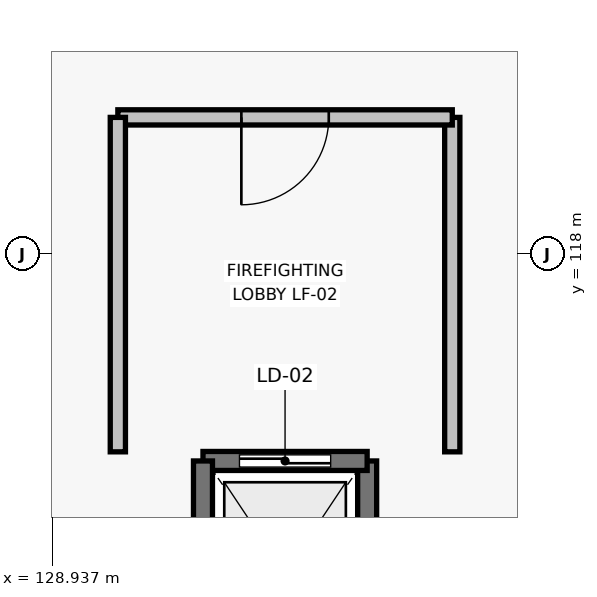
"""IFC4 building model, lengths in metres.
Left out: names, types, materials, properties, quantities, classifications, styles, units other than length and angle.
Written with IfcOpenShell. Run it as: python <this file> out.ifc"""

import sys

from ifc_helpers import new_model, si_unit, direction, frame, frame_2d, origin, place, context, subcontext, project, spatial, rectangle, extrude, element, fill, save


model = new_model("IFC4")
c1 = context("Model", 3, precision=1e-05, world=origin(), true_north=direction((0.0, 1.0)))
c2 = subcontext(c1, "Body", "Model", "MODEL_VIEW")
j1 = project(units=[si_unit("LENGTHUNIT", "METRE"), si_unit("PLANEANGLEUNIT", "RADIAN")], contexts=[c1])
p1 = place(None, origin())
s1 = spatial("IfcSite", under=j1, at=p1, CompositionType="ELEMENT")
p2 = place(p1, origin())
s2 = spatial("IfcBuilding", under=s1, at=p2, CompositionType="ELEMENT")
p3 = place(p2, frame((0.0, 0.0, 16.8)))
s3 = spatial("IfcBuildingStorey", under=s2, at=p3, CompositionType="ELEMENT", Elevation=16.8)
p4 = place(p3, frame((133.08, 112.32, 0.0), z_axis=(0.0, 0.0, 1.0), x_axis=(0.0, 1.0, 0.0)))
e1 = element("IfcWall", 1, at=p4, inside=s3, PredefinedType="SHEAR", context=c2, shape_type="SweptSolid", body=[
    extrude(rectangle(XDim=2.96, YDim=0.25, at=frame_2d((1.48, 0.0))), origin(), (0.0, 0.0, 1.0), 4.0),
])
p5 = place(p3, frame((133.08, 115.28, 0.0), z_axis=(0.0, 0.0, 1.0), x_axis=(-1.0, 0.0, 0.0)))
e2 = element("IfcWall", 2, at=p5, inside=s3, PredefinedType="SHEAR", context=c2, shape_type="SweptSolid", body=[
    extrude(rectangle(XDim=2.16, YDim=0.25, at=frame_2d((1.08, 0.0))), origin(), (0.0, 0.0, 1.0), 4.0),
])
p6 = place(p5, frame((0.48, 0.0, 0.0)))
e3 = element("IfcOpeningElement", 3, at=p6, cuts=e2, PredefinedType="OPENING", context=c2, shape_type="SweptSolid", body=[
    extrude(rectangle(XDim=1.2, YDim=2.2, at=frame_2d((0.6, 1.1))), frame((0.0, 0.135, 0.0), z_axis=(0.0, -1.0, 0.0), x_axis=(1.0, 0.0, 0.0)), (0.0, 0.0, 1.0), 0.27),
])
p7 = place(p3, frame((130.92, 115.28, 0.0), z_axis=(0.0, 0.0, 1.0), x_axis=(0.0, -1.0, 0.0)))
e4 = element("IfcWall", 4, at=p7, inside=s3, PredefinedType="SHEAR", context=c2, shape_type="SweptSolid", body=[
    extrude(rectangle(XDim=2.96, YDim=0.25, at=frame_2d((1.48, 0.0))), origin(), (0.0, 0.0, 1.0), 4.0),
])
p8 = place(p3, frame((134.2, 115.4, 0.0), z_axis=(0.0, 0.0, 1.0), x_axis=(0.0, 1.0, 0.0)))
e5 = element("IfcWall", 5, at=p8, inside=s3, PredefinedType="PARTITIONING", context=c2, shape_type="SweptSolid", body=[
    extrude(rectangle(XDim=4.4, YDim=0.2, at=frame_2d((2.2, 0.0))), origin(), (0.0, 0.0, 1.0), 3.665),
])
p9 = place(p3, frame((134.2, 119.8, 0.0), z_axis=(0.0, 0.0, 1.0), x_axis=(-1.0, 0.0, 0.0)))
e6 = element("IfcWall", 6, at=p9, inside=s3, PredefinedType="PARTITIONING", context=c2, shape_type="SweptSolid", body=[
    extrude(rectangle(XDim=4.4, YDim=0.2, at=frame_2d((2.2, 0.0))), origin(), (0.0, 0.0, 1.0), 4.0),
])
p10 = place(p9, frame((2.775, 0.0, 0.0), z_axis=(0.0, 0.0, 1.0), x_axis=(-1.0, 0.0, 0.0)))
e7 = element("IfcOpeningElement", 7, at=p10, cuts=e6, PredefinedType="OPENING", context=c2, shape_type="SweptSolid", body=[
    extrude(rectangle(XDim=1.15, YDim=2.2, at=frame_2d((0.575, 1.1))), frame((0.0, 0.11, 0.0), z_axis=(0.0, -1.0, 0.0), x_axis=(1.0, 0.0, 0.0)), (0.0, 0.0, 1.0), 0.22),
])
p11 = place(p3, frame((129.8, 119.8, 0.0), z_axis=(0.0, 0.0, 1.0), x_axis=(0.0, -1.0, 0.0)))
e8 = element("IfcWall", 8, at=p11, inside=s3, PredefinedType="PARTITIONING", context=c2, shape_type="SweptSolid", body=[
    extrude(rectangle(XDim=4.4, YDim=0.2, at=frame_2d((2.2, 0.0))), origin(), (0.0, 0.0, 1.0), 4.0),
])
p12 = place(p6, origin())
e9 = element("IfcDoor", 9, at=p12, inside=s3, OperationType="SLIDING_TO_LEFT", PredefinedType="DOOR", context=c2, shape_type="SweptSolid", body=[
    extrude(rectangle(XDim=1.2, YDim=2.2, at=frame_2d((0.6, 1.1))), frame((0.0, 0.025, 0.0), z_axis=(0.0, -1.0, 0.0), x_axis=(1.0, 0.0, 0.0)), (0.0, 0.0, 1.0), 0.05),
])
fill(e3, e9)
p13 = place(p10, origin())
e10 = element("IfcDoor", 10, at=p13, inside=s3, OperationType="SINGLE_SWING_RIGHT", PredefinedType="DOOR", context=c2, shape_type="SweptSolid", body=[
    extrude(rectangle(XDim=1.15, YDim=2.2, at=frame_2d((0.575, 1.1))), frame((0.0, 0.025, 0.0), z_axis=(0.0, -1.0, 0.0), x_axis=(1.0, 0.0, 0.0)), (0.0, 0.0, 1.0), 0.05),
])
fill(e7, e10)
save(model, sys.argv[1])
